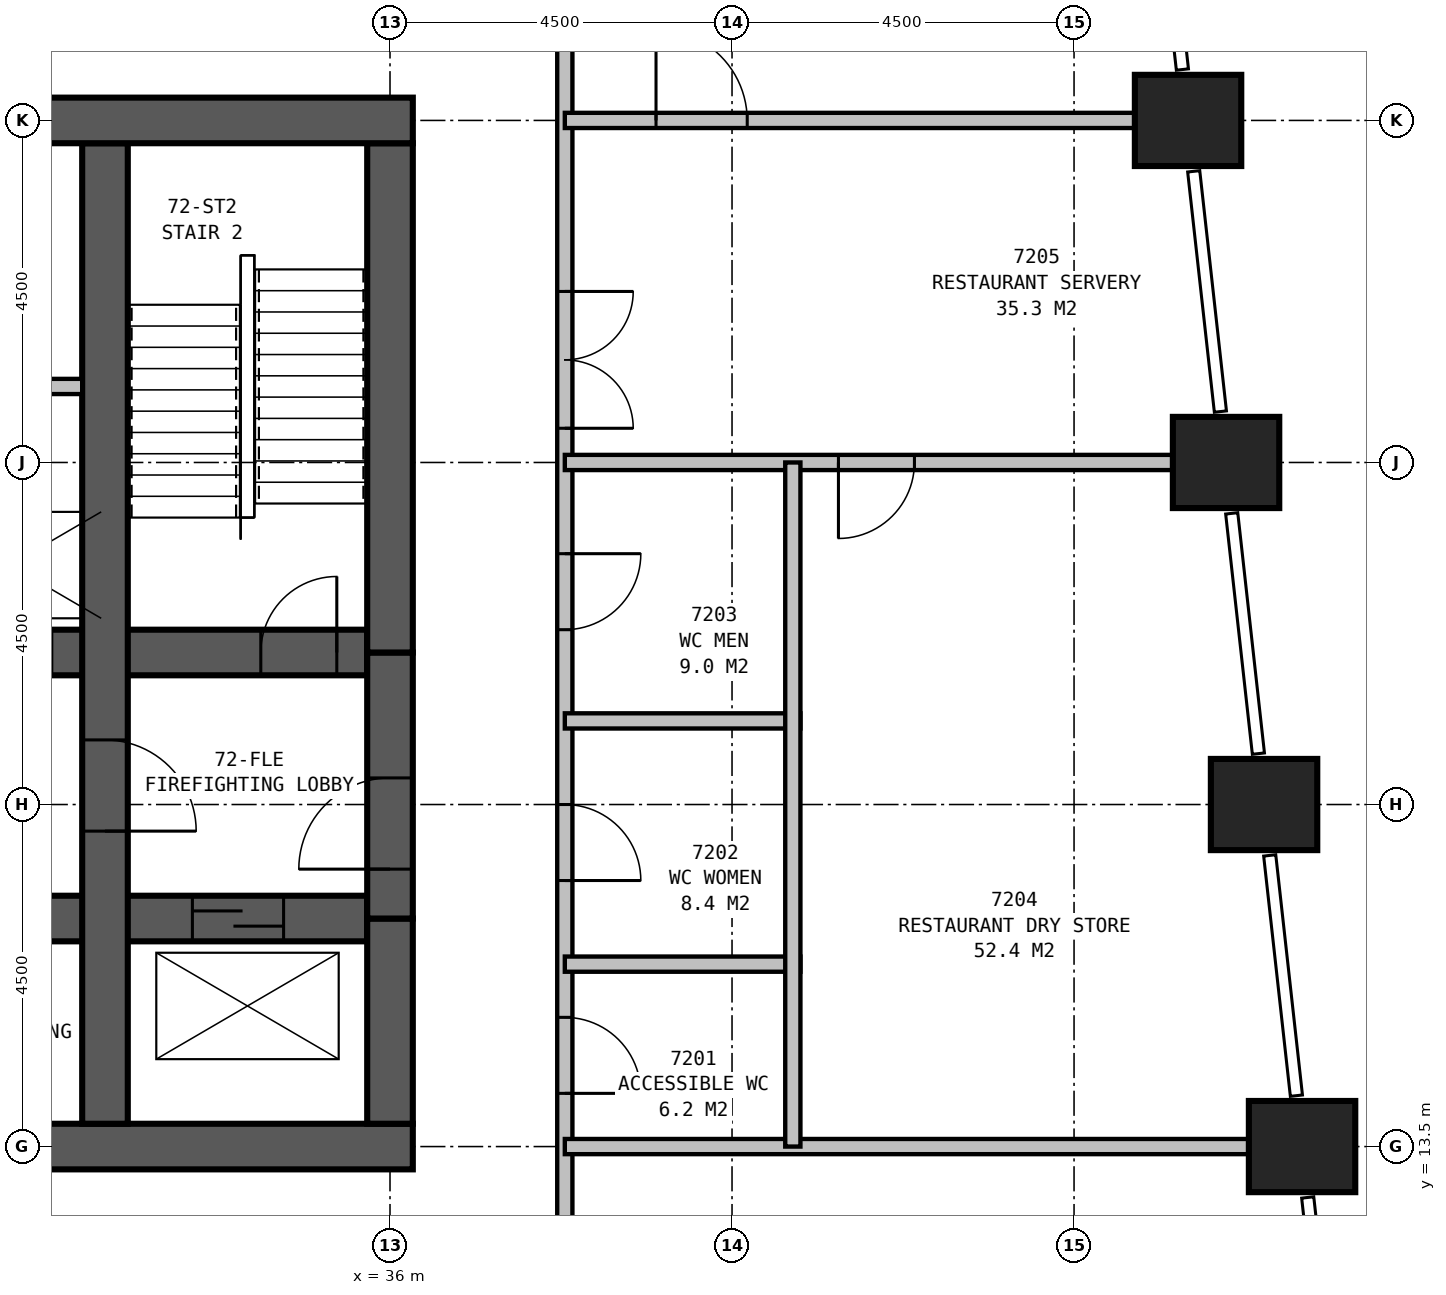
"""IFC4 building model, lengths in metres.
Left out: names, types, materials, properties, quantities, classifications, styles, units other than length and angle.
Written with IfcOpenShell. Run it as: python <this file> out.ifc"""

import sys

from ifc_helpers import new_model, si_unit, direction, frame, frame_2d, origin, origin_2d, place, context, subcontext, project, spatial, rectangle, extrude, element, fill, save


model = new_model("IFC4")
c1 = context("Model", 3, precision=1e-05, world=origin(), true_north=direction((0.0, 1.0)))
c2 = subcontext(c1, "Body", "Model", "MODEL_VIEW")
j1 = project(units=[si_unit("LENGTHUNIT", "METRE"), si_unit("PLANEANGLEUNIT", "RADIAN")], contexts=[c1])
p1 = place(None, origin())
s1 = spatial("IfcSite", under=j1, at=p1, CompositionType="ELEMENT")
p2 = place(p1, origin())
s2 = spatial("IfcBuilding", under=s1, at=p2, CompositionType="ELEMENT")
p3 = place(p2, frame((0.0, 0.0, 281.9)))
s3 = spatial("IfcBuildingStorey", under=s2, at=p3, CompositionType="ELEMENT", Elevation=281.9)
for number, where, z_axis, x_axis in (
    (1, (48.0, 13.5, 0.0), (0.0, 0.0, 1.0), (1.0, 0.0, 0.0)),
    (2, (47.5, 18.0, 0.0), (0.0, 0.0, 1.0), (1.0, 0.0, 0.0)),
    (3, (47.0, 22.5, 0.0), (0.0, 0.0, 1.0), (1.0, 0.0, 0.0)),
    (4, (46.5, 27.0, 0.0), (0.0, 0.0, 1.0), (1.0, 0.0, 0.0)),
):
    element("IfcColumn", number, at=place(p3, frame(where, z_axis=z_axis, x_axis=x_axis)), inside=s3, PredefinedType="COLUMN", context=c2, shape_type="SweptSolid", body=[
        extrude(rectangle(XDim=1.4, YDim=1.2, at=origin_2d()), origin(), (0.0, 0.0, 1.0), 3.9),
    ])
p4 = place(p3, frame((13.2, 13.5, 0.0), z_axis=(0.0, 0.0, 1.0), x_axis=(1.0, 0.0, 0.0)))
e5 = element("IfcWall", 5, at=p4, inside=s3, PredefinedType="SHEAR", context=c2, shape_type="SweptSolid", body=[
    extrude(rectangle(XDim=23.1, YDim=0.6, at=frame_2d((11.55, 0.0))), origin(), (0.0, 0.0, 1.0), 3.9),
])
p5 = place(p3, frame((36.3, 27.0, 0.0), z_axis=(0.0, 0.0, 1.0), x_axis=(-1.0, 0.0, 0.0)))
e6 = element("IfcWall", 6, at=p5, inside=s3, PredefinedType="SHEAR", context=c2, shape_type="SweptSolid", body=[
    extrude(rectangle(XDim=23.6, YDim=0.6, at=frame_2d((11.8, 0.0))), origin(), (0.0, 0.0, 1.0), 3.9),
])
p6 = place(p5, frame((17.05, 0.0, 0.0)))
e7 = element("IfcOpeningElement", 7, at=p6, cuts=e6, PredefinedType="OPENING", context=c2, shape_type="SweptSolid", body=[
    extrude(rectangle(XDim=1.0, YDim=2.1, at=frame_2d((0.5, 1.05))), frame((0.0, 0.31, 0.0), z_axis=(0.0, -1.0, 0.0), x_axis=(1.0, 0.0, 0.0)), (0.0, 0.0, 1.0), 0.62),
])
p7 = place(p5, frame((12.05, 0.0, 0.0)))
e8 = element("IfcOpeningElement", 8, at=p7, cuts=e6, PredefinedType="OPENING", context=c2, shape_type="SweptSolid", body=[
    extrude(rectangle(XDim=1.0, YDim=2.1, at=frame_2d((0.5, 1.05))), frame((0.0, 0.31, 0.0), z_axis=(0.0, -1.0, 0.0), x_axis=(1.0, 0.0, 0.0)), (0.0, 0.0, 1.0), 0.62),
])
p8 = place(p5, frame((7.05, 0.0, 0.0)))
e9 = element("IfcOpeningElement", 9, at=p8, cuts=e6, PredefinedType="OPENING", context=c2, shape_type="SweptSolid", body=[
    extrude(rectangle(XDim=1.0, YDim=2.1, at=frame_2d((0.5, 1.05))), frame((0.0, 0.31, 0.0), z_axis=(0.0, -1.0, 0.0), x_axis=(1.0, 0.0, 0.0)), (0.0, 0.0, 1.0), 0.62),
])
p9 = place(p3, frame((32.25, 13.8, 0.0), z_axis=(0.0, 0.0, 1.0), x_axis=(0.0, 1.0, 0.0)))
e10 = element("IfcWall", 10, at=p9, inside=s3, PredefinedType="SHEAR", context=c2, shape_type="SweptSolid", body=[
    extrude(rectangle(XDim=12.9, YDim=0.6, at=frame_2d((6.45, 0.0))), origin(), (0.0, 0.0, 1.0), 3.9),
])
p10 = place(p9, frame((5.05, 0.0, 0.0), z_axis=(0.0, 0.0, 1.0), x_axis=(-1.0, 0.0, 0.0)))
e11 = element("IfcOpeningElement", 11, at=p10, cuts=e10, PredefinedType="OPENING", context=c2, shape_type="SweptSolid", body=[
    extrude(rectangle(XDim=1.2, YDim=2.1, at=frame_2d((0.6, 1.05))), frame((0.0, 0.31, 0.0), z_axis=(0.0, -1.0, 0.0), x_axis=(1.0, 0.0, 0.0)), (0.0, 0.0, 1.0), 0.62),
])
p11 = place(p3, frame((13.8, 16.5, 0.0), z_axis=(0.0, 0.0, 1.0), x_axis=(1.0, 0.0, 0.0)))
e12 = element("IfcWall", 12, at=p11, inside=s3, PredefinedType="SHEAR", context=c2, shape_type="SweptSolid", body=[
    extrude(rectangle(XDim=21.9, YDim=0.6, at=frame_2d((10.95, 0.0))), origin(), (0.0, 0.0, 1.0), 3.9),
])
p12 = place(p11, frame((5.75, 0.0, 0.0), z_axis=(0.0, 0.0, 1.0), x_axis=(-1.0, 0.0, 0.0)))
e13 = element("IfcOpeningElement", 13, at=p12, cuts=e12, PredefinedType="OPENING", context=c2, shape_type="SweptSolid", body=[
    extrude(rectangle(XDim=1.0, YDim=2.1, at=frame_2d((0.5, 1.05))), frame((0.0, 0.31, 0.0), z_axis=(0.0, -1.0, 0.0), x_axis=(1.0, 0.0, 0.0)), (0.0, 0.0, 1.0), 0.62),
])
p13 = place(p11, frame((10.2, 0.0, 0.0), z_axis=(0.0, 0.0, 1.0), x_axis=(-1.0, 0.0, 0.0)))
e14 = element("IfcOpeningElement", 14, at=p13, cuts=e12, PredefinedType="OPENING", context=c2, shape_type="SweptSolid", body=[
    extrude(rectangle(XDim=1.0, YDim=2.1, at=frame_2d((0.5, 1.05))), frame((0.0, 0.31, 0.0), z_axis=(0.0, -1.0, 0.0), x_axis=(1.0, 0.0, 0.0)), (0.0, 0.0, 1.0), 0.62),
])
p14 = place(p11, frame((12.7, 0.0, 0.0), z_axis=(0.0, 0.0, 1.0), x_axis=(-1.0, 0.0, 0.0)))
e15 = element("IfcOpeningElement", 15, at=p14, cuts=e12, PredefinedType="OPENING", context=c2, shape_type="SweptSolid", body=[
    extrude(rectangle(XDim=1.0, YDim=2.1, at=frame_2d((0.5, 1.05))), frame((0.0, 0.31, 0.0), z_axis=(0.0, -1.0, 0.0), x_axis=(1.0, 0.0, 0.0)), (0.0, 0.0, 1.0), 0.62),
])
p15 = place(p11, frame((17.15, 0.0, 0.0), z_axis=(0.0, 0.0, 1.0), x_axis=(-1.0, 0.0, 0.0)))
e16 = element("IfcOpeningElement", 16, at=p15, cuts=e12, PredefinedType="OPENING", context=c2, shape_type="SweptSolid", body=[
    extrude(rectangle(XDim=1.0, YDim=2.1, at=frame_2d((0.5, 1.05))), frame((0.0, 0.31, 0.0), z_axis=(0.0, -1.0, 0.0), x_axis=(1.0, 0.0, 0.0)), (0.0, 0.0, 1.0), 0.62),
])
p16 = place(p11, frame((0.6, 0.0, 0.0)))
e17 = element("IfcOpeningElement", 17, at=p16, cuts=e12, PredefinedType="OPENING", context=c2, shape_type="SweptSolid", body=[
    extrude(rectangle(XDim=1.2, YDim=2.1, at=frame_2d((0.6, 1.05))), frame((0.0, 0.31, 0.0), z_axis=(0.0, -1.0, 0.0), x_axis=(1.0, 0.0, 0.0)), (0.0, 0.0, 1.0), 0.62),
])
p17 = place(p11, frame((19.6, 0.0, 0.0)))
e18 = element("IfcOpeningElement", 18, at=p17, cuts=e12, PredefinedType="OPENING", context=c2, shape_type="SweptSolid", body=[
    extrude(rectangle(XDim=1.2, YDim=2.1, at=frame_2d((0.6, 1.05))), frame((0.0, 0.31, 0.0), z_axis=(0.0, -1.0, 0.0), x_axis=(1.0, 0.0, 0.0)), (0.0, 0.0, 1.0), 0.62),
])
p18 = place(p3, frame((13.8, 20.0, 0.0), z_axis=(0.0, 0.0, 1.0), x_axis=(1.0, 0.0, 0.0)))
e19 = element("IfcWall", 19, at=p18, inside=s3, PredefinedType="SHEAR", context=c2, shape_type="SweptSolid", body=[
    extrude(rectangle(XDim=21.9, YDim=0.6, at=frame_2d((10.95, 0.0))), origin(), (0.0, 0.0, 1.0), 3.9),
])
p19 = place(p18, frame((0.5, 0.0, 0.0)))
e20 = element("IfcOpeningElement", 20, at=p19, cuts=e19, PredefinedType="OPENING", context=c2, shape_type="SweptSolid", body=[
    extrude(rectangle(XDim=1.0, YDim=2.1, at=frame_2d((0.5, 1.05))), frame((0.0, 0.31, 0.0), z_axis=(0.0, -1.0, 0.0), x_axis=(1.0, 0.0, 0.0)), (0.0, 0.0, 1.0), 0.62),
])
p20 = place(p18, frame((20.5, 0.0, 0.0)))
e21 = element("IfcOpeningElement", 21, at=p20, cuts=e19, PredefinedType="OPENING", context=c2, shape_type="SweptSolid", body=[
    extrude(rectangle(XDim=1.0, YDim=2.1, at=frame_2d((0.5, 1.05))), frame((0.0, 0.31, 0.0), z_axis=(0.0, -1.0, 0.0), x_axis=(1.0, 0.0, 0.0)), (0.0, 0.0, 1.0), 0.62),
])
p21 = place(p18, frame((9.15, 0.0, 0.0)))
e22 = element("IfcOpeningElement", 22, at=p21, cuts=e19, PredefinedType="OPENING", context=c2, shape_type="SweptSolid", body=[
    extrude(rectangle(XDim=1.1, YDim=2.1, at=frame_2d((0.55, 1.05))), frame((0.0, 0.31, 0.0), z_axis=(0.0, -1.0, 0.0), x_axis=(1.0, 0.0, 0.0)), (0.0, 0.0, 1.0), 0.62),
])
p22 = place(p18, frame((11.65, 0.0, 0.0)))
e23 = element("IfcOpeningElement", 23, at=p22, cuts=e19, PredefinedType="OPENING", context=c2, shape_type="SweptSolid", body=[
    extrude(rectangle(XDim=1.1, YDim=2.1, at=frame_2d((0.55, 1.05))), frame((0.0, 0.31, 0.0), z_axis=(0.0, -1.0, 0.0), x_axis=(1.0, 0.0, 0.0)), (0.0, 0.0, 1.0), 0.62),
])
p23 = place(p18, frame((14.15, 0.0, 0.0)))
e24 = element("IfcOpeningElement", 24, at=p23, cuts=e19, PredefinedType="OPENING", context=c2, shape_type="SweptSolid", body=[
    extrude(rectangle(XDim=1.1, YDim=2.1, at=frame_2d((0.55, 1.05))), frame((0.0, 0.31, 0.0), z_axis=(0.0, -1.0, 0.0), x_axis=(1.0, 0.0, 0.0)), (0.0, 0.0, 1.0), 0.62),
])
p24 = place(p18, frame((16.65, 0.0, 0.0)))
e25 = element("IfcOpeningElement", 25, at=p24, cuts=e19, PredefinedType="OPENING", context=c2, shape_type="SweptSolid", body=[
    extrude(rectangle(XDim=1.1, YDim=2.1, at=frame_2d((0.55, 1.05))), frame((0.0, 0.31, 0.0), z_axis=(0.0, -1.0, 0.0), x_axis=(1.0, 0.0, 0.0)), (0.0, 0.0, 1.0), 0.62),
])
p25 = place(p18, frame((5.75, 0.0, 0.0), z_axis=(0.0, 0.0, 1.0), x_axis=(-1.0, 0.0, 0.0)))
e26 = element("IfcOpeningElement", 26, at=p25, cuts=e19, PredefinedType="OPENING", context=c2, shape_type="SweptSolid", body=[
    extrude(rectangle(XDim=1.0, YDim=2.1, at=frame_2d((0.5, 1.05))), frame((0.0, 0.31, 0.0), z_axis=(0.0, -1.0, 0.0), x_axis=(1.0, 0.0, 0.0)), (0.0, 0.0, 1.0), 0.62),
])
p26 = place(p18, frame((6.7, 0.0, 0.0)))
e27 = element("IfcOpeningElement", 27, at=p26, cuts=e19, PredefinedType="OPENING", context=c2, shape_type="SweptSolid", body=[
    extrude(rectangle(XDim=1.0, YDim=2.1, at=frame_2d((0.5, 1.05))), frame((0.0, 0.31, 0.0), z_axis=(0.0, -1.0, 0.0), x_axis=(1.0, 0.0, 0.0)), (0.0, 0.0, 1.0), 0.62),
])
p27 = place(p3, frame((36.0, 13.8, 0.0), z_axis=(0.0, 0.0, 1.0), x_axis=(0.0, 1.0, 0.0)))
e28 = element("IfcWall", 28, at=p27, inside=s3, PredefinedType="SHEAR", context=c2, shape_type="SweptSolid", body=[
    extrude(rectangle(XDim=2.7, YDim=0.6, at=frame_2d((1.35, 0.0))), origin(), (0.0, 0.0, 1.0), 3.9),
])
p28 = place(p3, frame((36.0, 16.5, 0.0), z_axis=(0.0, 0.0, 1.0), x_axis=(0.0, 1.0, 0.0)))
e29 = element("IfcWall", 29, at=p28, inside=s3, PredefinedType="SHEAR", context=c2, shape_type="SweptSolid", body=[
    extrude(rectangle(XDim=3.5, YDim=0.6, at=frame_2d((1.75, 0.0))), origin(), (0.0, 0.0, 1.0), 3.9),
])
p29 = place(p28, frame((0.65, 0.0, 0.0)))
e30 = element("IfcOpeningElement", 30, at=p29, cuts=e29, PredefinedType="OPENING", context=c2, shape_type="SweptSolid", body=[
    extrude(rectangle(XDim=1.2, YDim=2.1, at=frame_2d((0.6, 1.05))), frame((0.0, 0.31, 0.0), z_axis=(0.0, -1.0, 0.0), x_axis=(1.0, 0.0, 0.0)), (0.0, 0.0, 1.0), 0.62),
])
p30 = place(p3, frame((36.0, 20.0, 0.0), z_axis=(0.0, 0.0, 1.0), x_axis=(0.0, 1.0, 0.0)))
e31 = element("IfcWall", 31, at=p30, inside=s3, PredefinedType="SHEAR", context=c2, shape_type="SweptSolid", body=[
    extrude(rectangle(XDim=6.7, YDim=0.6, at=frame_2d((3.35, 0.0))), origin(), (0.0, 0.0, 1.0), 3.9),
])
p31 = place(p3, frame((38.3, 11.2, 0.0), z_axis=(0.0, 0.0, 1.0), x_axis=(0.0, 1.0, 0.0)))
e32 = element("IfcWall", 32, at=p31, inside=s3, PredefinedType="PARTITIONING", context=c2, shape_type="SweptSolid", body=[
    extrude(rectangle(XDim=18.1, YDim=0.2, at=frame_2d((9.05, 0.0))), origin(), (0.0, 0.0, 1.0), 3.65),
])
p32 = place(p31, frame((4.0, 0.0, 0.0), z_axis=(0.0, 0.0, 1.0), x_axis=(-1.0, 0.0, 0.0)))
e33 = element("IfcOpeningElement", 33, at=p32, cuts=e32, PredefinedType="OPENING", context=c2, shape_type="SweptSolid", body=[
    extrude(rectangle(XDim=1.0, YDim=2.1, at=frame_2d((0.5, 1.05))), frame((0.0, 0.11, 0.0), z_axis=(0.0, -1.0, 0.0), x_axis=(1.0, 0.0, 0.0)), (0.0, 0.0, 1.0), 0.22),
])
p33 = place(p31, frame((6.8, 0.0, 0.0), z_axis=(0.0, 0.0, 1.0), x_axis=(-1.0, 0.0, 0.0)))
e34 = element("IfcOpeningElement", 34, at=p33, cuts=e32, PredefinedType="OPENING", context=c2, shape_type="SweptSolid", body=[
    extrude(rectangle(XDim=1.0, YDim=2.1, at=frame_2d((0.5, 1.05))), frame((0.0, 0.11, 0.0), z_axis=(0.0, -1.0, 0.0), x_axis=(1.0, 0.0, 0.0)), (0.0, 0.0, 1.0), 0.22),
])
p34 = place(p31, frame((10.1, 0.0, 0.0), z_axis=(0.0, 0.0, 1.0), x_axis=(-1.0, 0.0, 0.0)))
e35 = element("IfcOpeningElement", 35, at=p34, cuts=e32, PredefinedType="OPENING", context=c2, shape_type="SweptSolid", body=[
    extrude(rectangle(XDim=1.0, YDim=2.1, at=frame_2d((0.5, 1.05))), frame((0.0, 0.11, 0.0), z_axis=(0.0, -1.0, 0.0), x_axis=(1.0, 0.0, 0.0)), (0.0, 0.0, 1.0), 0.22),
])
p35 = place(p31, frame((13.55, 0.0, 0.0), z_axis=(0.0, 0.0, 1.0), x_axis=(-1.0, 0.0, 0.0)))
e36 = element("IfcOpeningElement", 36, at=p35, cuts=e32, PredefinedType="OPENING", context=c2, shape_type="SweptSolid", body=[
    extrude(rectangle(XDim=1.8, YDim=2.4, at=frame_2d((0.9, 1.2))), frame((0.0, 0.11, 0.0), z_axis=(0.0, -1.0, 0.0), x_axis=(1.0, 0.0, 0.0)), (0.0, 0.0, 1.0), 0.22),
])
p36 = place(p3, frame((38.3, 13.5, 0.0), z_axis=(0.0, 0.0, 1.0), x_axis=(1.0, 0.0, 0.0)))
e37 = element("IfcWall", 37, at=p36, inside=s3, PredefinedType="PARTITIONING", context=c2, shape_type="SweptSolid", body=[
    extrude(rectangle(XDim=8.999, YDim=0.2, at=frame_2d((4.5, 0.0))), origin(), (0.0, 0.0, 1.0), 2.35),
])
p37 = place(p3, frame((38.3, 22.5, 0.0), z_axis=(0.0, 0.0, 1.0), x_axis=(1.0, 0.0, 0.0)))
e38 = element("IfcWall", 38, at=p37, inside=s3, PredefinedType="PARTITIONING", context=c2, shape_type="SweptSolid", body=[
    extrude(rectangle(XDim=7.999, YDim=0.2, at=frame_2d((4.0, 0.0))), origin(), (0.0, 0.0, 1.0), 2.75),
])
p38 = place(p37, frame((4.6, 0.0, 0.0), z_axis=(0.0, 0.0, 1.0), x_axis=(-1.0, 0.0, 0.0)))
e39 = element("IfcOpeningElement", 39, at=p38, cuts=e38, PredefinedType="OPENING", context=c2, shape_type="SweptSolid", body=[
    extrude(rectangle(XDim=1.0, YDim=2.1, at=frame_2d((0.5, 1.05))), frame((0.0, 0.11, 0.0), z_axis=(0.0, -1.0, 0.0), x_axis=(1.0, 0.0, 0.0)), (0.0, 0.0, 1.0), 0.22),
])
p39 = place(p3, frame((38.3, 27.0, 0.0), z_axis=(0.0, 0.0, 1.0), x_axis=(1.0, 0.0, 0.0)))
e40 = element("IfcWall", 40, at=p39, inside=s3, PredefinedType="PARTITIONING", context=c2, shape_type="SweptSolid", body=[
    extrude(rectangle(XDim=7.499, YDim=0.2, at=frame_2d((3.75, 0.0))), origin(), (0.0, 0.0, 1.0), 2.35),
])
p40 = place(p39, frame((1.2, 0.0, 0.0)))
e41 = element("IfcOpeningElement", 41, at=p40, cuts=e40, PredefinedType="OPENING", context=c2, shape_type="SweptSolid", body=[
    extrude(rectangle(XDim=1.2, YDim=2.1, at=frame_2d((0.6, 1.05))), frame((0.0, 0.11, 0.0), z_axis=(0.0, -1.0, 0.0), x_axis=(1.0, 0.0, 0.0)), (0.0, 0.0, 1.0), 0.22),
])
for number, where, z_axis, x_axis in (
    (42, (38.3, 15.9, 0.0), (0.0, 0.0, 1.0), (1.0, 0.0, 0.0)),
    (43, (38.3, 19.1, 0.0), (0.0, 0.0, 1.0), (1.0, 0.0, 0.0)),
):
    element("IfcWall", number, at=place(p3, frame(where, z_axis=z_axis, x_axis=x_axis)), inside=s3, PredefinedType="PARTITIONING", context=c2, shape_type="SweptSolid", body=[
        extrude(rectangle(XDim=3.1, YDim=0.2, at=frame_2d((1.55, 0.0))), origin(), (0.0, 0.0, 1.0), 3.65),
    ])
p41 = place(p3, frame((41.3, 13.5, 0.0), z_axis=(0.0, 0.0, 1.0), x_axis=(0.0, 1.0, 0.0)))
e44 = element("IfcWall", 44, at=p41, inside=s3, PredefinedType="PARTITIONING", context=c2, shape_type="SweptSolid", body=[
    extrude(rectangle(XDim=9.0, YDim=0.2, at=frame_2d((4.5, 0.0))), origin(), (0.0, 0.0, 1.0), 3.65),
])
p42 = place(p3, frame((17.55, 23.5, 0.0), z_axis=(0.0, 0.0, 1.0), x_axis=(1.0, 0.0, 0.0)))
e45 = element("IfcWall", 45, at=p42, inside=s3, PredefinedType="PARTITIONING", context=c2, shape_type="SweptSolid", body=[
    extrude(rectangle(XDim=14.4, YDim=0.2, at=frame_2d((7.2, 0.0))), origin(), (0.0, 0.0, 1.0), 3.65),
])
p43 = place(p42, frame((0.45, 0.0, 0.0)))
e46 = element("IfcOpeningElement", 46, at=p43, cuts=e45, PredefinedType="OPENING", context=c2, shape_type="SweptSolid", body=[
    extrude(rectangle(XDim=1.0, YDim=2.1, at=frame_2d((0.5, 1.05))), frame((0.0, 0.11, 0.0), z_axis=(0.0, -1.0, 0.0), x_axis=(1.0, 0.0, 0.0)), (0.0, 0.0, 1.0), 0.22),
])
p44 = place(p32, origin())
e47 = element("IfcDoor", 47, at=p44, inside=s3, OperationType="SINGLE_SWING_RIGHT", PredefinedType="DOOR", context=c2, shape_type="SweptSolid", body=[
    extrude(rectangle(XDim=1.0, YDim=2.1, at=frame_2d((0.5, 1.05))), frame((0.0, 0.025, 0.0), z_axis=(0.0, -1.0, 0.0), x_axis=(1.0, 0.0, 0.0)), (0.0, 0.0, 1.0), 0.05),
])
fill(e33, e47)
p45 = place(p33, origin())
e48 = element("IfcDoor", 48, at=p45, inside=s3, OperationType="SINGLE_SWING_RIGHT", PredefinedType="DOOR", context=c2, shape_type="SweptSolid", body=[
    extrude(rectangle(XDim=1.0, YDim=2.1, at=frame_2d((0.5, 1.05))), frame((0.0, 0.025, 0.0), z_axis=(0.0, -1.0, 0.0), x_axis=(1.0, 0.0, 0.0)), (0.0, 0.0, 1.0), 0.05),
])
fill(e34, e48)
p46 = place(p34, origin())
e49 = element("IfcDoor", 49, at=p46, inside=s3, OperationType="SINGLE_SWING_LEFT", PredefinedType="DOOR", context=c2, shape_type="SweptSolid", body=[
    extrude(rectangle(XDim=1.0, YDim=2.1, at=frame_2d((0.5, 1.05))), frame((0.0, 0.025, 0.0), z_axis=(0.0, -1.0, 0.0), x_axis=(1.0, 0.0, 0.0)), (0.0, 0.0, 1.0), 0.05),
])
fill(e35, e49)
p47 = place(p35, origin())
e50 = element("IfcDoor", 50, at=p47, inside=s3, OperationType="DOUBLE_DOOR_SINGLE_SWING", PredefinedType="DOOR", context=c2, shape_type="SweptSolid", body=[
    extrude(rectangle(XDim=1.8, YDim=2.4, at=frame_2d((0.9, 1.2))), frame((0.0, 0.025, 0.0), z_axis=(0.0, -1.0, 0.0), x_axis=(1.0, 0.0, 0.0)), (0.0, 0.0, 1.0), 0.05),
])
fill(e36, e50)
p48 = place(p38, origin())
e51 = element("IfcDoor", 51, at=p48, inside=s3, OperationType="SINGLE_SWING_RIGHT", PredefinedType="DOOR", context=c2, shape_type="SweptSolid", body=[
    extrude(rectangle(XDim=1.0, YDim=2.1, at=frame_2d((0.5, 1.05))), frame((0.0, 0.025, 0.0), z_axis=(0.0, -1.0, 0.0), x_axis=(1.0, 0.0, 0.0)), (0.0, 0.0, 1.0), 0.05),
])
fill(e39, e51)
p49 = place(p40, origin())
e52 = element("IfcDoor", 52, at=p49, inside=s3, OperationType="SINGLE_SWING_LEFT", PredefinedType="DOOR", context=c2, shape_type="SweptSolid", body=[
    extrude(rectangle(XDim=1.2, YDim=2.1, at=frame_2d((0.6, 1.05))), frame((0.0, 0.025, 0.0), z_axis=(0.0, -1.0, 0.0), x_axis=(1.0, 0.0, 0.0)), (0.0, 0.0, 1.0), 0.05),
])
fill(e41, e52)
p50 = place(p29, origin())
e53 = element("IfcDoor", 53, at=p50, inside=s3, OperationType="SINGLE_SWING_LEFT", PredefinedType="DOOR", context=c2, shape_type="SweptSolid", body=[
    extrude(rectangle(XDim=1.2, YDim=2.1, at=frame_2d((0.6, 1.05))), frame((0.0, 0.3, 0.0), z_axis=(0.0, -1.0, 0.0), x_axis=(1.0, 0.0, 0.0)), (0.0, 0.0, 1.0), 0.6),
])
fill(e30, e53)
p51 = place(p10, origin())
e54 = element("IfcDoor", 54, at=p51, inside=s3, OperationType="SINGLE_SWING_RIGHT", PredefinedType="DOOR", context=c2, shape_type="SweptSolid", body=[
    extrude(rectangle(XDim=1.2, YDim=2.1, at=frame_2d((0.6, 1.05))), frame((0.0, 0.3, 0.0), z_axis=(0.0, -1.0, 0.0), x_axis=(1.0, 0.0, 0.0)), (0.0, 0.0, 1.0), 0.6),
])
fill(e11, e54)
p52 = place(p20, origin())
e55 = element("IfcDoor", 55, at=p52, inside=s3, OperationType="SINGLE_SWING_RIGHT", PredefinedType="DOOR", context=c2, shape_type="SweptSolid", body=[
    extrude(rectangle(XDim=1.0, YDim=2.1, at=frame_2d((0.5, 1.05))), frame((0.0, 0.3, 0.0), z_axis=(0.0, -1.0, 0.0), x_axis=(1.0, 0.0, 0.0)), (0.0, 0.0, 1.0), 0.6),
])
fill(e21, e55)
p53 = place(p17, origin())
e56 = element("IfcDoor", 56, at=p53, inside=s3, OperationType="SLIDING_TO_LEFT", PredefinedType="DOOR", context=c2, shape_type="SweptSolid", body=[
    extrude(rectangle(XDim=1.2, YDim=2.1, at=frame_2d((0.6, 1.05))), frame((0.0, 0.3, 0.0), z_axis=(0.0, -1.0, 0.0), x_axis=(1.0, 0.0, 0.0)), (0.0, 0.0, 1.0), 0.6),
])
fill(e18, e56)
save(model, sys.argv[1])
